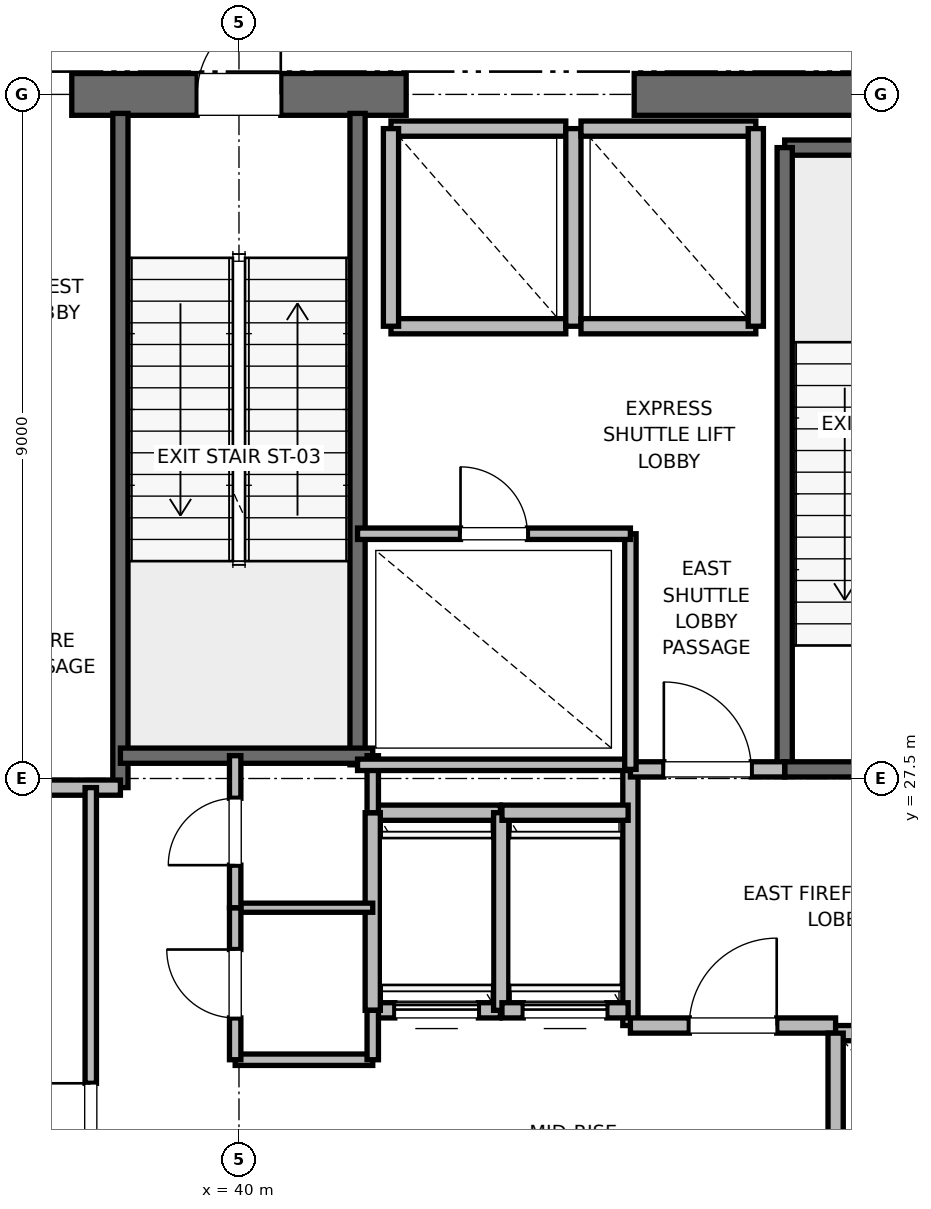
"""IFC4 building model, lengths in metres.
Left out: names, types, materials, properties, quantities, classifications, styles, units other than length and angle.
Written with IfcOpenShell. Run it as: python <this file> out.ifc"""

import sys

from ifc_helpers import new_model, si_unit, direction, frame, frame_2d, origin, place, context, subcontext, project, spatial, rectangle, extrude, element, fill, save


model = new_model("IFC4")
c1 = context("Model", 3, precision=1e-05, world=origin(), true_north=direction((0.0, 1.0)))
c2 = subcontext(c1, "Body", "Model", "MODEL_VIEW")
j1 = project(units=[si_unit("LENGTHUNIT", "METRE"), si_unit("PLANEANGLEUNIT", "RADIAN")], contexts=[c1])
p1 = place(None, origin())
s1 = spatial("IfcSite", under=j1, at=p1, CompositionType="ELEMENT")
p2 = place(p1, origin())
s2 = spatial("IfcBuilding", under=s1, at=p2, CompositionType="ELEMENT")
p3 = place(p2, frame((0.0, 0.0, 200.2)))
s3 = spatial("IfcBuildingStorey", under=s2, at=p3, CompositionType="ELEMENT", Elevation=200.2)
p4 = place(p3, frame((37.8, 36.5, 0.0), z_axis=(0.0, 0.0, 1.0), x_axis=(1.0, 0.0, 0.0)))
e1 = element("IfcWall", 1, at=p4, inside=s3, PredefinedType="SHEAR", context=c2, shape_type="SweptSolid", body=[
    extrude(rectangle(XDim=4.4, YDim=0.55, at=frame_2d((2.2, 0.0))), origin(), (0.0, 0.0, 1.0), 4.775),
])
p5 = place(p4, frame((1.65, 0.0, 0.0)))
e2 = element("IfcOpeningElement", 2, at=p5, cuts=e1, PredefinedType="OPENING", context=c2, shape_type="SweptSolid", body=[
    extrude(rectangle(XDim=1.1, YDim=2.15, at=frame_2d((0.55, 1.075))), frame((0.0, 0.275, 0.0), z_axis=(0.0, -1.0, 0.0), x_axis=(1.0, 0.0, 0.0)), (0.0, 0.0, 1.0), 0.55),
])
p6 = place(p3, frame((45.2, 36.5, 0.0), z_axis=(0.0, 0.0, 1.0), x_axis=(1.0, 0.0, 0.0)))
e3 = element("IfcWall", 3, at=p6, inside=s3, PredefinedType="SHEAR", context=c2, shape_type="SweptSolid", body=[
    extrude(rectangle(XDim=5.8, YDim=0.55, at=frame_2d((2.9, 0.0))), origin(), (0.0, 0.0, 1.0), 4.775),
])
p7 = place(p3, frame((47.18, 35.8, 0.0), z_axis=(0.0, 0.0, 1.0), x_axis=(1.0, 0.0, 0.0)))
e4 = element("IfcWall", 4, at=p7, inside=s3, PredefinedType="SOLIDWALL", context=c2, shape_type="SweptSolid", body=[
    extrude(rectangle(XDim=3.12, YDim=0.2, at=frame_2d((1.56, 0.0))), origin(), (0.0, 0.0, 1.0), 4.775),
])
p8 = place(p3, frame((47.18, 27.62, 0.0), z_axis=(0.0, 0.0, 1.0), x_axis=(0.0, 1.0, 0.0)))
e5 = element("IfcWall", 5, at=p8, inside=s3, PredefinedType="SOLIDWALL", context=c2, shape_type="SweptSolid", body=[
    extrude(rectangle(XDim=8.18, YDim=0.2, at=frame_2d((4.09, 0.0))), origin(), (0.0, 0.0, 1.0), 4.775),
])
p9 = place(p3, frame((47.18, 27.62, 0.0), z_axis=(0.0, 0.0, 1.0), x_axis=(1.0, 0.0, 0.0)))
e6 = element("IfcWall", 6, at=p9, inside=s3, PredefinedType="SOLIDWALL", context=c2, shape_type="SweptSolid", body=[
    extrude(rectangle(XDim=3.12, YDim=0.2, at=frame_2d((1.56, 0.0))), origin(), (0.0, 0.0, 1.0), 4.775),
])
p10 = place(p9, frame((1.01, 0.0, 0.0)))
e7 = element("IfcOpeningElement", 7, at=p10, cuts=e6, PredefinedType="OPENING", context=c2, shape_type="SweptSolid", body=[
    extrude(rectangle(XDim=1.1, YDim=2.15, at=frame_2d((0.55, 1.075))), frame((0.0, 0.1, 0.0), z_axis=(0.0, -1.0, 0.0), x_axis=(1.0, 0.0, 0.0)), (0.0, 0.0, 1.0), 0.2),
])
p11 = place(p3, frame((38.44, 27.38, 0.0), z_axis=(0.0, 0.0, 1.0), x_axis=(0.0, 1.0, 0.0)))
e8 = element("IfcWall", 8, at=p11, inside=s3, PredefinedType="SOLIDWALL", context=c2, shape_type="SweptSolid", body=[
    extrude(rectangle(XDim=8.87, YDim=0.2, at=frame_2d((4.435, 0.0))), origin(), (0.0, 0.0, 1.0), 4.775),
])
p12 = place(p3, frame((41.56, 27.68, 0.0), z_axis=(0.0, 0.0, 1.0), x_axis=(0.0, 1.0, 0.0)))
e9 = element("IfcWall", 9, at=p12, inside=s3, PredefinedType="SOLIDWALL", context=c2, shape_type="SweptSolid", body=[
    extrude(rectangle(XDim=8.57, YDim=0.2, at=frame_2d((4.285, 0.0))), origin(), (0.0, 0.0, 1.0), 4.775),
])
p13 = place(p3, frame((38.44, 27.8, 0.0), z_axis=(0.0, 0.0, 1.0), x_axis=(1.0, 0.0, 0.0)))
e10 = element("IfcWall", 10, at=p13, inside=s3, PredefinedType="SOLIDWALL", context=c2, shape_type="SweptSolid", body=[
    extrude(rectangle(XDim=3.32, YDim=0.2, at=frame_2d((1.66, 0.0))), origin(), (0.0, 0.0, 1.0), 4.775),
])
p14 = place(p3, frame((32.82, 27.38, 0.0), z_axis=(0.0, 0.0, 1.0), x_axis=(1.0, 0.0, 0.0)))
e11 = element("IfcWall", 11, at=p14, inside=s3, PredefinedType="PARTITIONING", context=c2, shape_type="SweptSolid", body=[
    extrude(rectangle(XDim=5.62, YDim=0.2, at=frame_2d((2.81, 0.0))), origin(), (0.0, 0.0, 1.0), 4.775),
])
p15 = place(p3, frame((45.15, 24.25, 0.0), z_axis=(0.0, 0.0, 1.0), x_axis=(0.0, 1.0, 0.0)))
e12 = element("IfcWall", 12, at=p15, inside=s3, PredefinedType="PARTITIONING", context=c2, shape_type="SweptSolid", body=[
    extrude(rectangle(XDim=3.37, YDim=0.2, at=frame_2d((1.685, 0.0))), origin(), (0.0, 0.0, 1.0), 4.775),
])
p16 = place(p3, frame((45.15, 24.25, 0.0), z_axis=(0.0, 0.0, 1.0), x_axis=(1.0, 0.0, 0.0)))
e13 = element("IfcWall", 13, at=p16, inside=s3, PredefinedType="PARTITIONING", context=c2, shape_type="SweptSolid", body=[
    extrude(rectangle(XDim=2.7, YDim=0.2, at=frame_2d((1.35, 0.0))), origin(), (0.0, 0.0, 1.0), 4.775),
])
p17 = place(p16, frame((0.775, 0.0, 0.0)))
e14 = element("IfcOpeningElement", 14, at=p17, cuts=e13, PredefinedType="OPENING", context=c2, shape_type="SweptSolid", body=[
    extrude(rectangle(XDim=1.15, YDim=2.2, at=frame_2d((0.575, 1.1))), frame((0.0, 0.1, 0.0), z_axis=(0.0, -1.0, 0.0), x_axis=(1.0, 0.0, 0.0)), (0.0, 0.0, 1.0), 0.2),
])
p18 = place(p3, frame((45.15, 27.62, 0.0), z_axis=(0.0, 0.0, 1.0), x_axis=(1.0, 0.0, 0.0)))
e15 = element("IfcWall", 15, at=p18, inside=s3, PredefinedType="PARTITIONING", context=c2, shape_type="SweptSolid", body=[
    extrude(rectangle(XDim=2.03, YDim=0.2, at=frame_2d((1.015, 0.0))), origin(), (0.0, 0.0, 1.0), 4.775),
])
p19 = place(p18, frame((0.44, 0.0, 0.0)))
e16 = element("IfcOpeningElement", 16, at=p19, cuts=e15, PredefinedType="OPENING", context=c2, shape_type="SweptSolid", body=[
    extrude(rectangle(XDim=1.15, YDim=2.2, at=frame_2d((0.575, 1.1))), frame((0.0, 0.1, 0.0), z_axis=(0.0, -1.0, 0.0), x_axis=(1.0, 0.0, 0.0)), (0.0, 0.0, 1.0), 0.2),
])
p20 = place(p3, frame((50.45, 24.15, 0.0), z_axis=(0.0, 0.0, 1.0), x_axis=(-1.0, 0.0, 0.0)))
e17 = element("IfcWall", 17, at=p20, inside=s3, PredefinedType="SOLIDWALL", context=c2, shape_type="SweptSolid", body=[
    extrude(rectangle(XDim=2.6, YDim=0.2, at=frame_2d((1.3, 0.0))), origin(), (0.0, 0.0, 1.0), 3.755),
])
p21 = place(p20, frame((0.75, 0.0, 0.0)))
e18 = element("IfcOpeningElement", 18, at=p21, cuts=e17, PredefinedType="OPENING", context=c2, shape_type="SweptSolid", body=[
    extrude(rectangle(XDim=1.1, YDim=2.2, at=frame_2d((0.55, 1.1))), frame((0.0, 0.1, 0.0), z_axis=(0.0, -1.0, 0.0), x_axis=(1.0, 0.0, 0.0)), (0.0, 0.0, 1.0), 0.2),
])
p22 = place(p3, frame((47.85, 24.15, 0.0), z_axis=(0.0, 0.0, 1.0), x_axis=(0.0, -1.0, 0.0)))
e19 = element("IfcWall", 19, at=p22, inside=s3, PredefinedType="SOLIDWALL", context=c2, shape_type="SweptSolid", body=[
    extrude(rectangle(XDim=3.0, YDim=0.2, at=frame_2d((1.5, 0.0))), origin(), (0.0, 0.0, 1.0), 4.775),
])
p23 = place(p3, frame((41.76, 24.45, 0.0), z_axis=(0.0, 0.0, 1.0), x_axis=(1.0, 0.0, 0.0)))
e20 = element("IfcWall", 20, at=p23, inside=s3, PredefinedType="SOLIDWALL", context=c2, shape_type="SweptSolid", body=[
    extrude(rectangle(XDim=1.68, YDim=0.2, at=frame_2d((0.84, 0.0))), origin(), (0.0, 0.0, 1.0), 4.775),
])
p24 = place(p23, frame((0.29, 0.0, 0.0)))
e21 = element("IfcOpeningElement", 21, at=p24, cuts=e20, PredefinedType="OPENING", context=c2, shape_type="SweptSolid", body=[
    extrude(rectangle(XDim=1.1, YDim=2.2, at=frame_2d((0.55, 1.1))), frame((0.0, 0.1, 0.0), z_axis=(0.0, -1.0, 0.0), x_axis=(1.0, 0.0, 0.0)), (0.0, 0.0, 1.0), 0.2),
])
p25 = place(p3, frame((43.44, 27.05, 0.0), z_axis=(0.0, 0.0, 1.0), x_axis=(-1.0, 0.0, 0.0)))
e22 = element("IfcWall", 22, at=p25, inside=s3, PredefinedType="SOLIDWALL", context=c2, shape_type="SweptSolid", body=[
    extrude(rectangle(XDim=1.68, YDim=0.2, at=frame_2d((0.84, 0.0))), origin(), (0.0, 0.0, 1.0), 4.775),
])
for number, where, z_axis, x_axis in (
    (23, (41.76, 27.05, 0.0), (0.0, 0.0, 1.0), (0.0, -1.0, 0.0)),
    (24, (43.45, 24.45, 0.0), (0.0, 0.0, 1.0), (0.0, 1.0, 0.0)),
):
    element("IfcWall", number, at=place(p3, frame(where, z_axis=z_axis, x_axis=x_axis)), inside=s3, PredefinedType="SOLIDWALL", context=c2, shape_type="SweptSolid", body=[
        extrude(rectangle(XDim=2.6, YDim=0.2, at=frame_2d((1.3, 0.0))), origin(), (0.0, 0.0, 1.0), 4.775),
    ])
p26 = place(p3, frame((43.46, 24.45, 0.0), z_axis=(0.0, 0.0, 1.0), x_axis=(1.0, 0.0, 0.0)))
e25 = element("IfcWall", 25, at=p26, inside=s3, PredefinedType="SOLIDWALL", context=c2, shape_type="SweptSolid", body=[
    extrude(rectangle(XDim=1.66, YDim=0.2, at=frame_2d((0.83, 0.0))), origin(), (0.0, 0.0, 1.0), 4.775),
])
p27 = place(p26, frame((0.28, 0.0, 0.0)))
e26 = element("IfcOpeningElement", 26, at=p27, cuts=e25, PredefinedType="OPENING", context=c2, shape_type="SweptSolid", body=[
    extrude(rectangle(XDim=1.1, YDim=2.2, at=frame_2d((0.55, 1.1))), frame((0.0, 0.1, 0.0), z_axis=(0.0, -1.0, 0.0), x_axis=(1.0, 0.0, 0.0)), (0.0, 0.0, 1.0), 0.2),
])
p28 = place(p3, frame((45.12, 27.05, 0.0), z_axis=(0.0, 0.0, 1.0), x_axis=(-1.0, 0.0, 0.0)))
e27 = element("IfcWall", 27, at=p28, inside=s3, PredefinedType="SOLIDWALL", context=c2, shape_type="SweptSolid", body=[
    extrude(rectangle(XDim=1.66, YDim=0.2, at=frame_2d((0.83, 0.0))), origin(), (0.0, 0.0, 1.0), 4.775),
])
p29 = place(p3, frame((42.0, 33.45, 0.0), z_axis=(0.0, 0.0, 1.0), x_axis=(1.0, 0.0, 0.0)))
e28 = element("IfcWall", 28, at=p29, inside=s3, PredefinedType="SOLIDWALL", context=c2, shape_type="SweptSolid", body=[
    extrude(rectangle(XDim=2.3, YDim=0.2, at=frame_2d((1.15, 0.0))), origin(), (0.0, 0.0, 1.0), 4.775),
])
p30 = place(p3, frame((44.3, 36.05, 0.0), z_axis=(0.0, 0.0, 1.0), x_axis=(-1.0, 0.0, 0.0)))
e29 = element("IfcWall", 29, at=p30, inside=s3, PredefinedType="SOLIDWALL", context=c2, shape_type="SweptSolid", body=[
    extrude(rectangle(XDim=2.3, YDim=0.2, at=frame_2d((1.15, 0.0))), origin(), (0.0, 0.0, 1.0), 3.755),
])
for number, where, z_axis, x_axis in (
    (30, (42.0, 36.05, 0.0), (0.0, 0.0, 1.0), (0.0, -1.0, 0.0)),
    (31, (44.4, 33.45, 0.0), (0.0, 0.0, 1.0), (0.0, 1.0, 0.0)),
):
    element("IfcWall", number, at=place(p3, frame(where, z_axis=z_axis, x_axis=x_axis)), inside=s3, PredefinedType="SOLIDWALL", context=c2, shape_type="SweptSolid", body=[
        extrude(rectangle(XDim=2.6, YDim=0.2, at=frame_2d((1.3, 0.0))), origin(), (0.0, 0.0, 1.0), 3.755),
    ])
p31 = place(p3, frame((44.5, 33.45, 0.0), z_axis=(0.0, 0.0, 1.0), x_axis=(1.0, 0.0, 0.0)))
e32 = element("IfcWall", 32, at=p31, inside=s3, PredefinedType="SOLIDWALL", context=c2, shape_type="SweptSolid", body=[
    extrude(rectangle(XDim=2.3, YDim=0.2, at=frame_2d((1.15, 0.0))), origin(), (0.0, 0.0, 1.0), 4.775),
])
p32 = place(p3, frame((46.8, 36.05, 0.0), z_axis=(0.0, 0.0, 1.0), x_axis=(-1.0, 0.0, 0.0)))
e33 = element("IfcWall", 33, at=p32, inside=s3, PredefinedType="SOLIDWALL", context=c2, shape_type="SweptSolid", body=[
    extrude(rectangle(XDim=2.3, YDim=0.2, at=frame_2d((1.15, 0.0))), origin(), (0.0, 0.0, 1.0), 3.755),
])
p33 = place(p3, frame((46.8, 33.45, 0.0), z_axis=(0.0, 0.0, 1.0), x_axis=(0.0, 1.0, 0.0)))
e34 = element("IfcWall", 34, at=p33, inside=s3, PredefinedType="SOLIDWALL", context=c2, shape_type="SweptSolid", body=[
    extrude(rectangle(XDim=2.6, YDim=0.2, at=frame_2d((1.3, 0.0))), origin(), (0.0, 0.0, 1.0), 4.775),
])
p34 = place(p3, frame((39.95, 23.8, 0.0), z_axis=(0.0, 0.0, 1.0), x_axis=(1.0, 0.0, 0.0)))
e35 = element("IfcWall", 35, at=p34, inside=s3, PredefinedType="PARTITIONING", context=c2, shape_type="SweptSolid", body=[
    extrude(rectangle(XDim=1.81, YDim=0.15, at=frame_2d((0.905, 0.0))), origin(), (0.0, 0.0, 1.0), 2.85),
])
p35 = place(p3, frame((39.95, 25.8, 0.0), z_axis=(0.0, 0.0, 1.0), x_axis=(1.0, 0.0, 0.0)))
e36 = element("IfcWall", 36, at=p35, inside=s3, PredefinedType="PARTITIONING", context=c2, shape_type="SweptSolid", body=[
    extrude(rectangle(XDim=1.81, YDim=0.12, at=frame_2d((0.905, 0.0))), origin(), (0.0, 0.0, 1.0), 2.85),
])
p36 = place(p3, frame((41.76, 23.8, 0.0), z_axis=(0.0, 0.0, 1.0), x_axis=(0.0, 1.0, 0.0)))
e37 = element("IfcWall", 37, at=p36, inside=s3, PredefinedType="PARTITIONING", context=c2, shape_type="SweptSolid", body=[
    extrude(rectangle(XDim=0.65, YDim=0.15, at=frame_2d((0.325, 0.0))), origin(), (0.0, 0.0, 1.0), 2.85),
])
p37 = place(p3, frame((41.76, 27.05, 0.0), z_axis=(0.0, 0.0, 1.0), x_axis=(0.0, 1.0, 0.0)))
e38 = element("IfcWall", 38, at=p37, inside=s3, PredefinedType="PARTITIONING", context=c2, shape_type="SweptSolid", body=[
    extrude(rectangle(XDim=0.75, YDim=0.15, at=frame_2d((0.375, 0.0))), origin(), (0.0, 0.0, 1.0), 2.85),
])
p38 = place(p3, frame((39.95, 23.8, 0.0), z_axis=(0.0, 0.0, 1.0), x_axis=(0.0, 1.0, 0.0)))
e39 = element("IfcWall", 39, at=p38, inside=s3, PredefinedType="PARTITIONING", context=c2, shape_type="SweptSolid", body=[
    extrude(rectangle(XDim=2.0, YDim=0.15, at=frame_2d((1.0, 0.0))), origin(), (0.0, 0.0, 1.0), 2.85),
])
p39 = place(p38, frame((0.55, 0.0, 0.0)))
e40 = element("IfcOpeningElement", 40, at=p39, cuts=e39, PredefinedType="OPENING", context=c2, shape_type="SweptSolid", body=[
    extrude(rectangle(XDim=0.9, YDim=2.1, at=frame_2d((0.45, 1.05))), frame((0.0, 0.075, 0.0), z_axis=(0.0, -1.0, 0.0), x_axis=(1.0, 0.0, 0.0)), (0.0, 0.0, 1.0), 0.15),
])
p40 = place(p3, frame((39.95, 25.8, 0.0), z_axis=(0.0, 0.0, 1.0), x_axis=(0.0, 1.0, 0.0)))
e41 = element("IfcWall", 41, at=p40, inside=s3, PredefinedType="PARTITIONING", context=c2, shape_type="SweptSolid", body=[
    extrude(rectangle(XDim=2.0, YDim=0.15, at=frame_2d((1.0, 0.0))), origin(), (0.0, 0.0, 1.0), 2.85),
])
p41 = place(p40, frame((0.56, 0.0, 0.0)))
e42 = element("IfcOpeningElement", 42, at=p41, cuts=e41, PredefinedType="OPENING", context=c2, shape_type="SweptSolid", body=[
    extrude(rectangle(XDim=0.88, YDim=2.1, at=frame_2d((0.44, 1.05))), frame((0.0, 0.075, 0.0), z_axis=(0.0, -1.0, 0.0), x_axis=(1.0, 0.0, 0.0)), (0.0, 0.0, 1.0), 0.15),
])
p42 = place(p3, frame((38.05, 18.6, 0.0), z_axis=(0.0, 0.0, 1.0), x_axis=(0.0, 1.0, 0.0)))
e43 = element("IfcWall", 43, at=p42, inside=s3, PredefinedType="PARTITIONING", context=c2, shape_type="SweptSolid", body=[
    extrude(rectangle(XDim=8.78, YDim=0.15, at=frame_2d((4.39, 0.0))), origin(), (0.0, 0.0, 1.0), 2.85),
])
p43 = place(p42, frame((3.89, 0.0, 0.0)))
e44 = element("IfcOpeningElement", 44, at=p43, cuts=e43, PredefinedType="OPENING", context=c2, shape_type="SweptSolid", body=[
    extrude(rectangle(XDim=1.0, YDim=2.15, at=frame_2d((0.5, 1.075))), frame((0.0, 0.075, 0.0), z_axis=(0.0, -1.0, 0.0), x_axis=(1.0, 0.0, 0.0)), (0.0, 0.0, 1.0), 0.15),
])
p44 = place(p3, frame((41.56, 27.68, 0.0), z_axis=(0.0, 0.0, 1.0), x_axis=(1.0, 0.0, 0.0)))
e45 = element("IfcWall", 45, at=p44, inside=s3, PredefinedType="PARTITIONING", context=c2, shape_type="SweptSolid", body=[
    extrude(rectangle(XDim=3.59, YDim=0.15, at=frame_2d((1.795, 0.0))), origin(), (0.0, 0.0, 1.0), 2.85),
])
p45 = place(p3, frame((45.15, 27.62, 0.0), z_axis=(0.0, 0.0, 1.0), x_axis=(0.0, 1.0, 0.0)))
e46 = element("IfcWall", 46, at=p45, inside=s3, PredefinedType="PARTITIONING", context=c2, shape_type="SweptSolid", body=[
    extrude(rectangle(XDim=3.1, YDim=0.15, at=frame_2d((1.55, 0.0))), origin(), (0.0, 0.0, 1.0), 2.85),
])
p46 = place(p3, frame((41.56, 30.72, 0.0), z_axis=(0.0, 0.0, 1.0), x_axis=(1.0, 0.0, 0.0)))
e47 = element("IfcWall", 47, at=p46, inside=s3, PredefinedType="PARTITIONING", context=c2, shape_type="SweptSolid", body=[
    extrude(rectangle(XDim=3.59, YDim=0.15, at=frame_2d((1.795, 0.0))), origin(), (0.0, 0.0, 1.0), 2.85),
])
p47 = place(p46, frame((1.355, 0.0, 0.0)))
e48 = element("IfcOpeningElement", 48, at=p47, cuts=e47, PredefinedType="OPENING", context=c2, shape_type="SweptSolid", body=[
    extrude(rectangle(XDim=0.88, YDim=2.1, at=frame_2d((0.44, 1.05))), frame((0.0, 0.075, 0.0), z_axis=(0.0, -1.0, 0.0), x_axis=(1.0, 0.0, 0.0)), (0.0, 0.0, 1.0), 0.15),
])
p48 = place(p5, origin())
e49 = element("IfcDoor", 49, at=p48, inside=s3, OperationType="SINGLE_SWING_RIGHT", PredefinedType="DOOR", context=c2, shape_type="SweptSolid", body=[
    extrude(rectangle(XDim=1.1, YDim=2.15, at=frame_2d((0.55, 1.075))), frame((0.0, 0.025, 0.0), z_axis=(0.0, -1.0, 0.0), x_axis=(1.0, 0.0, 0.0)), (0.0, 0.0, 1.0), 0.05),
])
fill(e2, e49)
p49 = place(p17, origin())
e50 = element("IfcDoor", 50, at=p49, inside=s3, OperationType="SINGLE_SWING_RIGHT", PredefinedType="DOOR", context=c2, shape_type="SweptSolid", body=[
    extrude(rectangle(XDim=1.15, YDim=2.2, at=frame_2d((0.575, 1.1))), frame((0.0, 0.025, 0.0), z_axis=(0.0, -1.0, 0.0), x_axis=(1.0, 0.0, 0.0)), (0.0, 0.0, 1.0), 0.05),
])
fill(e14, e50)
p50 = place(p19, origin())
e51 = element("IfcDoor", 51, at=p50, inside=s3, OperationType="SINGLE_SWING_LEFT", PredefinedType="DOOR", context=c2, shape_type="SweptSolid", body=[
    extrude(rectangle(XDim=1.15, YDim=2.2, at=frame_2d((0.575, 1.1))), frame((0.0, 0.025, 0.0), z_axis=(0.0, -1.0, 0.0), x_axis=(1.0, 0.0, 0.0)), (0.0, 0.0, 1.0), 0.05),
])
fill(e16, e51)
p51 = place(p24, origin())
e52 = element("IfcDoor", 52, at=p51, inside=s3, OperationType="SLIDING_TO_RIGHT", PredefinedType="DOOR", context=c2, shape_type="SweptSolid", body=[
    extrude(rectangle(XDim=1.1, YDim=2.2, at=frame_2d((0.55, 1.1))), frame((0.0, 0.025, 0.0), z_axis=(0.0, -1.0, 0.0), x_axis=(1.0, 0.0, 0.0)), (0.0, 0.0, 1.0), 0.05),
])
fill(e21, e52)
p52 = place(p27, origin())
e53 = element("IfcDoor", 53, at=p52, inside=s3, OperationType="SLIDING_TO_RIGHT", PredefinedType="DOOR", context=c2, shape_type="SweptSolid", body=[
    extrude(rectangle(XDim=1.1, YDim=2.2, at=frame_2d((0.55, 1.1))), frame((0.0, 0.025, 0.0), z_axis=(0.0, -1.0, 0.0), x_axis=(1.0, 0.0, 0.0)), (0.0, 0.0, 1.0), 0.05),
])
fill(e26, e53)
p53 = place(p39, origin())
e54 = element("IfcDoor", 54, at=p53, inside=s3, OperationType="SINGLE_SWING_RIGHT", PredefinedType="DOOR", context=c2, shape_type="SweptSolid", body=[
    extrude(rectangle(XDim=0.9, YDim=2.1, at=frame_2d((0.45, 1.05))), frame((0.0, 0.025, 0.0), z_axis=(0.0, -1.0, 0.0), x_axis=(1.0, 0.0, 0.0)), (0.0, 0.0, 1.0), 0.05),
])
fill(e40, e54)
p54 = place(p41, origin())
e55 = element("IfcDoor", 55, at=p54, inside=s3, OperationType="SINGLE_SWING_LEFT", PredefinedType="DOOR", context=c2, shape_type="SweptSolid", body=[
    extrude(rectangle(XDim=0.88, YDim=2.1, at=frame_2d((0.44, 1.05))), frame((0.0, 0.025, 0.0), z_axis=(0.0, -1.0, 0.0), x_axis=(1.0, 0.0, 0.0)), (0.0, 0.0, 1.0), 0.05),
])
fill(e42, e55)
p55 = place(p43, origin())
e56 = element("IfcDoor", 56, at=p55, inside=s3, OperationType="SINGLE_SWING_RIGHT", PredefinedType="DOOR", context=c2, shape_type="SweptSolid", body=[
    extrude(rectangle(XDim=1.0, YDim=2.15, at=frame_2d((0.5, 1.075))), frame((0.0, 0.025, 0.0), z_axis=(0.0, -1.0, 0.0), x_axis=(1.0, 0.0, 0.0)), (0.0, 0.0, 1.0), 0.05),
])
fill(e44, e56)
p56 = place(p47, origin())
e57 = element("IfcDoor", 57, at=p56, inside=s3, OperationType="SINGLE_SWING_LEFT", PredefinedType="DOOR", context=c2, shape_type="SweptSolid", body=[
    extrude(rectangle(XDim=0.88, YDim=2.1, at=frame_2d((0.44, 1.05))), frame((0.0, 0.025, 0.0), z_axis=(0.0, -1.0, 0.0), x_axis=(1.0, 0.0, 0.0)), (0.0, 0.0, 1.0), 0.05),
])
fill(e48, e57)
save(model, sys.argv[1])
